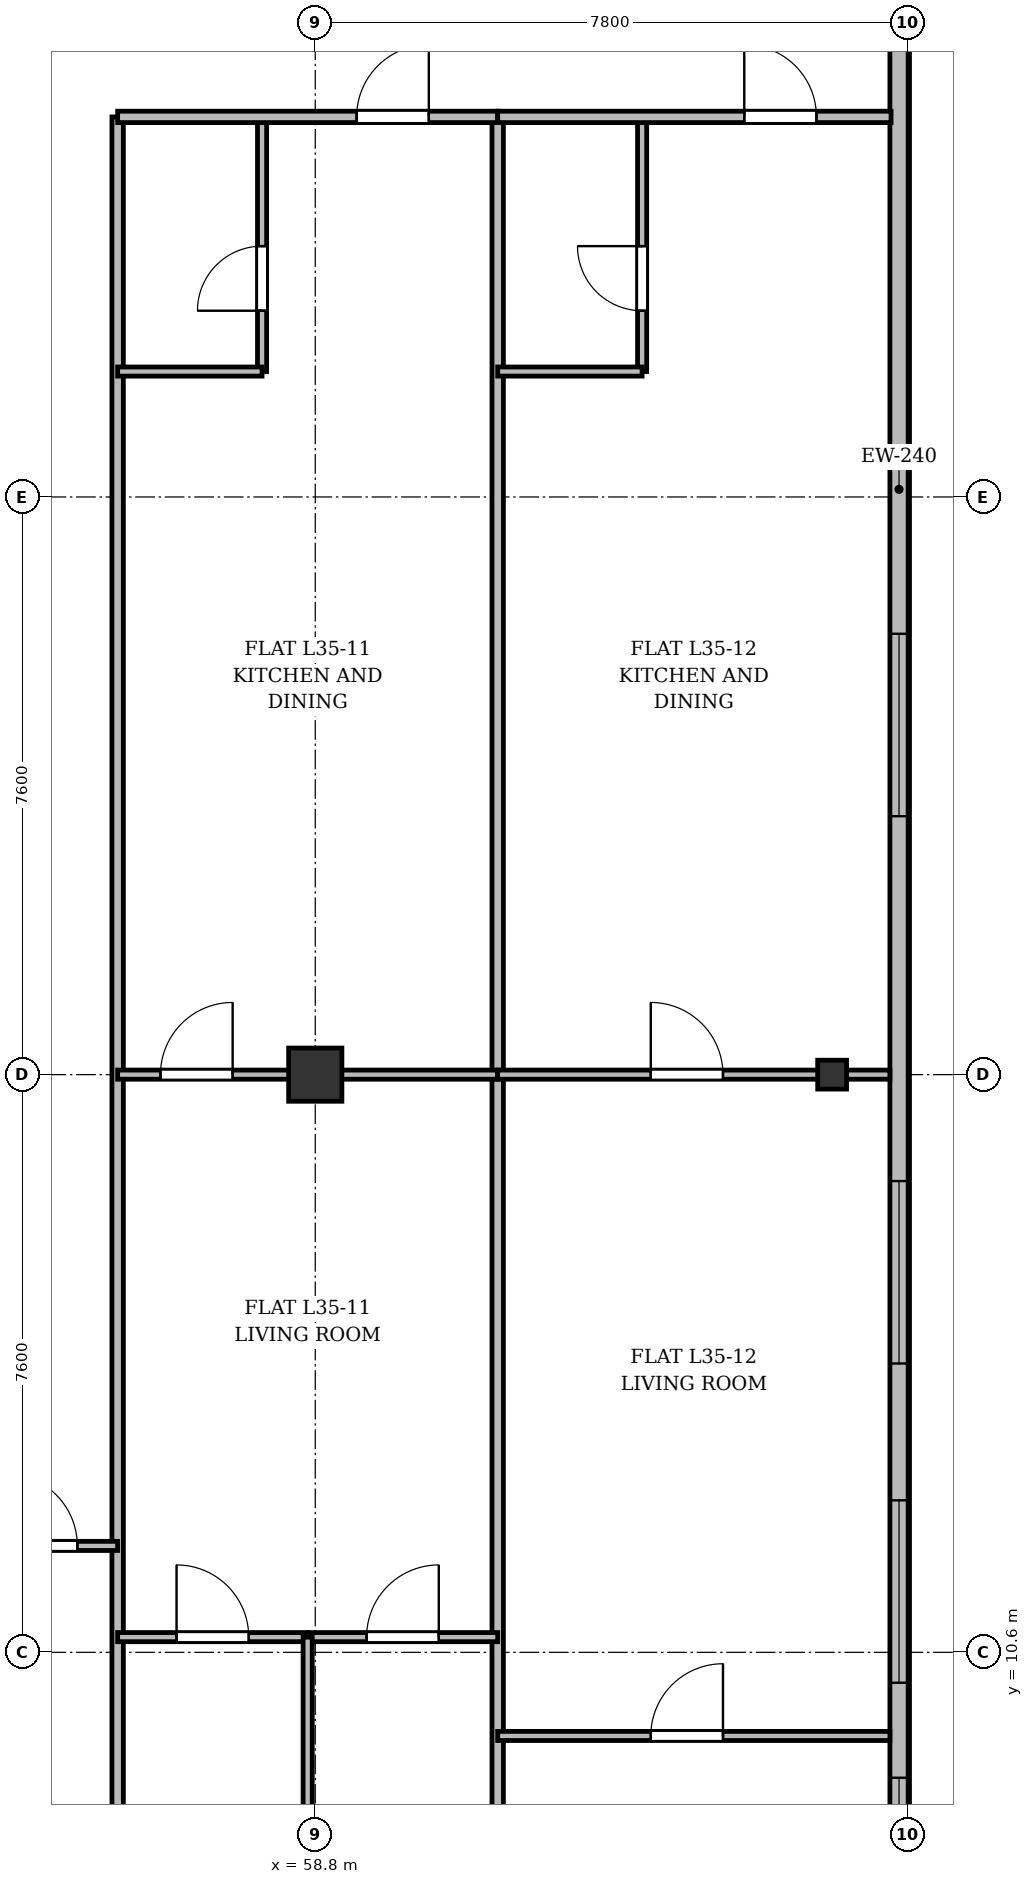
"""IFC4 building model, lengths in metres.
Left out: names, types, materials, properties, quantities, classifications, styles, units other than length and angle.
Written with IfcOpenShell. Run it as: python <this file> out.ifc"""

import sys

from ifc_helpers import new_model, si_unit, direction, frame, frame_2d, origin, origin_2d, place, context, subcontext, project, spatial, rectangle, i_section, extrude, source, transform, mapped, element, fill, save


model = new_model("IFC4")
c1 = context("Model", 3, precision=1e-05, world=origin(), true_north=direction((0.0, 1.0)))
c2 = subcontext(c1, "Body", "Model", "MODEL_VIEW")
j1 = project(units=[si_unit("LENGTHUNIT", "METRE"), si_unit("PLANEANGLEUNIT", "RADIAN")], contexts=[c1])
p1 = place(None, origin())
s1 = spatial("IfcSite", under=j1, at=p1, CompositionType="ELEMENT")
p2 = place(p1, origin())
s2 = spatial("IfcBuilding", under=s1, at=p2, CompositionType="ELEMENT")
p3 = place(p2, frame((0.0, 0.0, 135.7)))
s3 = spatial("IfcBuildingStorey", under=s2, at=p3, CompositionType="ELEMENT", Elevation=135.7)
m1 = source(origin(), c2, "Body", "SweptSolid", [
    extrude(rectangle(XDim=0.7, YDim=0.7, at=origin_2d()), origin(), (0.0, 0.0, 1.0), 3.6),
])
p4 = place(p3, frame((58.8, 18.2, 0.0), z_axis=(0.0, 0.0, 1.0), x_axis=(1.0, 0.0, 0.0)))
e1 = element("IfcColumn", 1, at=p4, inside=s3, PredefinedType="COLUMN", context=c2, shape_type="MappedRepresentation", body=[
    mapped(m1, transform((0.0, 0.0, 0.0), x_axis=(1.0, 0.0, 0.0), y_axis=(0.0, 1.0, 0.0), z_axis=(0.0, 0.0, 1.0), scale=1.0)),
])
m2 = source(origin(), c2, "Body", "SweptSolid", [
    extrude(i_section(OverallWidth=0.38, OverallDepth=0.38, WebThickness=0.02, FlangeThickness=0.03, at=origin_2d()), origin(), (0.0, 0.0, 1.0), 3.6),
])
p5 = place(p3, frame((65.6, 18.2, 0.0), z_axis=(0.0, 0.0, 1.0), x_axis=(1.0, 0.0, 0.0)))
e2 = element("IfcColumn", 2, at=p5, inside=s3, PredefinedType="COLUMN", context=c2, shape_type="MappedRepresentation", body=[
    mapped(m2, transform((0.0, 0.0, 0.0), x_axis=(1.0, 0.0, 0.0), y_axis=(0.0, 1.0, 0.0), z_axis=(0.0, 0.0, 1.0), scale=1.0)),
])
p6 = place(p3, frame((66.48, 45.5, 0.0), z_axis=(0.0, 0.0, 1.0), x_axis=(0.0, -1.0, 0.0)))
e3 = element("IfcWall", 3, at=p6, inside=s3, PredefinedType="SOLIDWALL", context=c2, shape_type="SweptSolid", body=[
    extrude(rectangle(XDim=39.2, YDim=0.24, at=frame_2d((19.6, 0.0))), origin(), (0.0, 0.0, 1.0), 3.35),
])
p7 = place(p6, frame((36.55, 0.0, 0.92)))
e4 = element("IfcOpeningElement", 4, at=p7, cuts=e3, PredefinedType="OPENING", context=c2, shape_type="SweptSolid", body=[
    extrude(rectangle(XDim=1.2, YDim=1.65, at=frame_2d((0.6, 0.825))), frame((0.0, 0.13, 0.0), z_axis=(0.0, -1.0, 0.0), x_axis=(1.0, 0.0, 0.0)), (0.0, 0.0, 1.0), 0.26),
])
p8 = place(p6, frame((32.9, 0.0, 0.92)))
e5 = element("IfcOpeningElement", 5, at=p8, cuts=e3, PredefinedType="OPENING", context=c2, shape_type="SweptSolid", body=[
    extrude(rectangle(XDim=2.4, YDim=2.1, at=frame_2d((1.2, 1.05))), frame((0.0, 0.13, 0.0), z_axis=(0.0, -1.0, 0.0), x_axis=(1.0, 0.0, 0.0)), (0.0, 0.0, 1.0), 0.26),
])
p9 = place(p6, frame((28.7, 0.0, 0.92)))
e6 = element("IfcOpeningElement", 6, at=p9, cuts=e3, PredefinedType="OPENING", context=c2, shape_type="SweptSolid", body=[
    extrude(rectangle(XDim=2.4, YDim=2.1, at=frame_2d((1.2, 1.05))), frame((0.0, 0.13, 0.0), z_axis=(0.0, -1.0, 0.0), x_axis=(1.0, 0.0, 0.0)), (0.0, 0.0, 1.0), 0.26),
])
p10 = place(p6, frame((21.5, 0.0, 0.92)))
e7 = element("IfcOpeningElement", 7, at=p10, cuts=e3, PredefinedType="OPENING", context=c2, shape_type="SweptSolid", body=[
    extrude(rectangle(XDim=2.4, YDim=2.1, at=frame_2d((1.2, 1.05))), frame((0.0, 0.13, 0.0), z_axis=(0.0, -1.0, 0.0), x_axis=(1.0, 0.0, 0.0)), (0.0, 0.0, 1.0), 0.26),
])
p11 = place(p6, frame((7.5, 0.0, 0.92)))
e8 = element("IfcOpeningElement", 8, at=p11, cuts=e3, PredefinedType="OPENING", context=c2, shape_type="SweptSolid", body=[
    extrude(rectangle(XDim=2.4, YDim=2.1, at=frame_2d((1.2, 1.05))), frame((0.0, 0.13, 0.0), z_axis=(0.0, -1.0, 0.0), x_axis=(1.0, 0.0, 0.0)), (0.0, 0.0, 1.0), 0.26),
])
p12 = place(p6, frame((4.5, 0.0, 0.92)))
e9 = element("IfcOpeningElement", 9, at=p12, cuts=e3, PredefinedType="OPENING", context=c2, shape_type="SweptSolid", body=[
    extrude(rectangle(XDim=1.2, YDim=1.65, at=frame_2d((0.6, 0.825))), frame((0.0, 0.13, 0.0), z_axis=(0.0, -1.0, 0.0), x_axis=(1.0, 0.0, 0.0)), (0.0, 0.0, 1.0), 0.26),
])
p13 = place(p6, frame((1.15, 0.0, 0.92)))
e10 = element("IfcOpeningElement", 10, at=p13, cuts=e3, PredefinedType="OPENING", context=c2, shape_type="SweptSolid", body=[
    extrude(rectangle(XDim=1.2, YDim=1.65, at=frame_2d((0.6, 0.825))), frame((0.0, 0.13, 0.0), z_axis=(0.0, -1.0, 0.0), x_axis=(1.0, 0.0, 0.0)), (0.0, 0.0, 1.0), 0.26),
])
for number, where, z_axis, x_axis in (
    (11, (61.2, 3.525, 0.0), (0.0, 0.0, 1.0), (0.0, 1.0, 0.0)),
    (12, (56.2, 3.525, 0.0), (0.0, 0.0, 1.0), (0.0, 1.0, 0.0)),
):
    element("IfcWall", number, at=place(p3, frame(where, z_axis=z_axis, x_axis=x_axis)), inside=s3, PredefinedType="PARTITIONING", context=c2, shape_type="SweptSolid", body=[
        extrude(rectangle(XDim=27.275, YDim=0.15, at=frame_2d((13.638, 0.0))), origin(), (0.0, 0.0, 1.0), 2.75),
    ])
p14 = place(p3, frame((54.2, 12.0, 0.0), z_axis=(0.0, 0.0, 1.0), x_axis=(1.0, 0.0, 0.0)))
e13 = element("IfcWall", 13, at=p14, inside=s3, PredefinedType="PARTITIONING", context=c2, shape_type="SweptSolid", body=[
    extrude(rectangle(XDim=2.0, YDim=0.12, at=frame_2d((1.0, 0.0))), origin(), (0.0, 0.0, 1.0), 3.35),
])
p15 = place(p14, frame((0.52, 0.0, 0.0)))
e14 = element("IfcOpeningElement", 14, at=p15, cuts=e13, PredefinedType="OPENING", context=c2, shape_type="SweptSolid", body=[
    extrude(rectangle(XDim=0.95, YDim=2.15, at=frame_2d((0.475, 1.075))), frame((0.0, 0.07, 0.0), z_axis=(0.0, -1.0, 0.0), x_axis=(1.0, 0.0, 0.0)), (0.0, 0.0, 1.0), 0.14),
])
p16 = place(p3, frame((56.2, 18.2, 0.0), z_axis=(0.0, 0.0, 1.0), x_axis=(1.0, 0.0, 0.0)))
e15 = element("IfcWall", 15, at=p16, inside=s3, PredefinedType="PARTITIONING", context=c2, shape_type="SweptSolid", body=[
    extrude(rectangle(XDim=5.0, YDim=0.12, at=frame_2d((2.5, 0.0))), origin(), (0.0, 0.0, 1.0), 2.75),
])
p17 = place(p16, frame((0.563, 0.0, 0.0)))
e16 = element("IfcOpeningElement", 16, at=p17, cuts=e15, PredefinedType="OPENING", context=c2, shape_type="SweptSolid", body=[
    extrude(rectangle(XDim=0.95, YDim=2.15, at=frame_2d((0.475, 1.075))), frame((0.0, 0.07, 0.0), z_axis=(0.0, -1.0, 0.0), x_axis=(1.0, 0.0, 0.0)), (0.0, 0.0, 1.0), 0.14),
])
p18 = place(p3, frame((58.1, 27.45, 0.0), z_axis=(0.0, 0.0, 1.0), x_axis=(0.0, 1.0, 0.0)))
e17 = element("IfcWall", 17, at=p18, inside=s3, PredefinedType="PARTITIONING", context=c2, shape_type="SweptSolid", body=[
    extrude(rectangle(XDim=3.35, YDim=0.12, at=frame_2d((1.675, 0.0))), origin(), (0.0, 0.0, 1.0), 3.35),
])
p19 = place(p18, frame((0.8, 0.0, 0.0)))
e18 = element("IfcOpeningElement", 18, at=p19, cuts=e17, PredefinedType="OPENING", context=c2, shape_type="SweptSolid", body=[
    extrude(rectangle(XDim=0.85, YDim=2.1, at=frame_2d((0.425, 1.05))), frame((0.0, 0.07, 0.0), z_axis=(0.0, -1.0, 0.0), x_axis=(1.0, 0.0, 0.0)), (0.0, 0.0, 1.0), 0.14),
])
p20 = place(p3, frame((56.2, 27.45, 0.0), z_axis=(0.0, 0.0, 1.0), x_axis=(1.0, 0.0, 0.0)))
e19 = element("IfcWall", 19, at=p20, inside=s3, PredefinedType="PARTITIONING", context=c2, shape_type="SweptSolid", body=[
    extrude(rectangle(XDim=1.9, YDim=0.12, at=frame_2d((0.95, 0.0))), origin(), (0.0, 0.0, 1.0), 3.35),
])
p21 = place(p3, frame((56.2, 30.8, 0.0), z_axis=(0.0, 0.0, 1.0), x_axis=(1.0, 0.0, 0.0)))
e20 = element("IfcWall", 20, at=p21, inside=s3, PredefinedType="PARTITIONING", context=c2, shape_type="SweptSolid", body=[
    extrude(rectangle(XDim=5.0, YDim=0.15, at=frame_2d((2.5, 0.0))), origin(), (0.0, 0.0, 1.0), 2.85),
])
p22 = place(p21, frame((3.144, 0.0, 0.0)))
e21 = element("IfcOpeningElement", 21, at=p22, cuts=e20, PredefinedType="OPENING", context=c2, shape_type="SweptSolid", body=[
    extrude(rectangle(XDim=0.95, YDim=2.15, at=frame_2d((0.475, 1.075))), frame((0.0, 0.085, 0.0), z_axis=(0.0, -1.0, 0.0), x_axis=(1.0, 0.0, 0.0)), (0.0, 0.0, 1.0), 0.17),
])
p23 = place(p3, frame((56.2, 10.8, 0.0), z_axis=(0.0, 0.0, 1.0), x_axis=(1.0, 0.0, 0.0)))
e22 = element("IfcWall", 22, at=p23, inside=s3, PredefinedType="PARTITIONING", context=c2, shape_type="SweptSolid", body=[
    extrude(rectangle(XDim=2.5, YDim=0.12, at=frame_2d((1.25, 0.0))), origin(), (0.0, 0.0, 1.0), 3.0),
])
p24 = place(p23, frame((0.775, 0.0, 0.0)))
e23 = element("IfcOpeningElement", 23, at=p24, cuts=e22, PredefinedType="OPENING", context=c2, shape_type="SweptSolid", body=[
    extrude(rectangle(XDim=0.95, YDim=2.15, at=frame_2d((0.475, 1.075))), frame((0.0, 0.07, 0.0), z_axis=(0.0, -1.0, 0.0), x_axis=(1.0, 0.0, 0.0)), (0.0, 0.0, 1.0), 0.14),
])
p25 = place(p3, frame((58.7, 10.8, 0.0), z_axis=(0.0, 0.0, 1.0), x_axis=(1.0, 0.0, 0.0)))
e24 = element("IfcWall", 24, at=p25, inside=s3, PredefinedType="PARTITIONING", context=c2, shape_type="SweptSolid", body=[
    extrude(rectangle(XDim=2.5, YDim=0.12, at=frame_2d((1.25, 0.0))), origin(), (0.0, 0.0, 1.0), 2.85),
])
p26 = place(p25, frame((0.775, 0.0, 0.0)))
e25 = element("IfcOpeningElement", 25, at=p26, cuts=e24, PredefinedType="OPENING", context=c2, shape_type="SweptSolid", body=[
    extrude(rectangle(XDim=0.95, YDim=2.15, at=frame_2d((0.475, 1.075))), frame((0.0, 0.07, 0.0), z_axis=(0.0, -1.0, 0.0), x_axis=(1.0, 0.0, 0.0)), (0.0, 0.0, 1.0), 0.14),
])
p27 = place(p3, frame((58.7, 3.525, 0.0), z_axis=(0.0, 0.0, 1.0), x_axis=(0.0, 1.0, 0.0)))
e26 = element("IfcWall", 26, at=p27, inside=s3, PredefinedType="PARTITIONING", context=c2, shape_type="SweptSolid", body=[
    extrude(rectangle(XDim=7.275, YDim=0.12, at=frame_2d((3.638, 0.0))), origin(), (0.0, 0.0, 1.0), 2.75),
])
p28 = place(p3, frame((61.2, 18.2, 0.0), z_axis=(0.0, 0.0, 1.0), x_axis=(1.0, 0.0, 0.0)))
e27 = element("IfcWall", 27, at=p28, inside=s3, PredefinedType="PARTITIONING", context=c2, shape_type="SweptSolid", body=[
    extrude(rectangle(XDim=5.16, YDim=0.12, at=frame_2d((2.58, 0.0))), origin(), (0.0, 0.0, 1.0), 2.75),
])
p29 = place(p28, frame((2.014, 0.0, 0.0)))
e28 = element("IfcOpeningElement", 28, at=p29, cuts=e27, PredefinedType="OPENING", context=c2, shape_type="SweptSolid", body=[
    extrude(rectangle(XDim=0.95, YDim=2.15, at=frame_2d((0.475, 1.075))), frame((0.0, 0.07, 0.0), z_axis=(0.0, -1.0, 0.0), x_axis=(1.0, 0.0, 0.0)), (0.0, 0.0, 1.0), 0.14),
])
p30 = place(p3, frame((63.1, 27.45, 0.0), z_axis=(0.0, 0.0, 1.0), x_axis=(0.0, 1.0, 0.0)))
e29 = element("IfcWall", 29, at=p30, inside=s3, PredefinedType="PARTITIONING", context=c2, shape_type="SweptSolid", body=[
    extrude(rectangle(XDim=3.35, YDim=0.12, at=frame_2d((1.675, 0.0))), origin(), (0.0, 0.0, 1.0), 3.35),
])
p31 = place(p30, frame((0.8, 0.0, 0.0)))
e30 = element("IfcOpeningElement", 30, at=p31, cuts=e29, PredefinedType="OPENING", context=c2, shape_type="SweptSolid", body=[
    extrude(rectangle(XDim=0.85, YDim=2.1, at=frame_2d((0.425, 1.05))), frame((0.0, 0.07, 0.0), z_axis=(0.0, -1.0, 0.0), x_axis=(1.0, 0.0, 0.0)), (0.0, 0.0, 1.0), 0.14),
])
p32 = place(p3, frame((61.2, 27.45, 0.0), z_axis=(0.0, 0.0, 1.0), x_axis=(1.0, 0.0, 0.0)))
e31 = element("IfcWall", 31, at=p32, inside=s3, PredefinedType="PARTITIONING", context=c2, shape_type="SweptSolid", body=[
    extrude(rectangle(XDim=1.9, YDim=0.12, at=frame_2d((0.95, 0.0))), origin(), (0.0, 0.0, 1.0), 3.35),
])
p33 = place(p3, frame((61.2, 30.8, 0.0), z_axis=(0.0, 0.0, 1.0), x_axis=(1.0, 0.0, 0.0)))
e32 = element("IfcWall", 32, at=p33, inside=s3, PredefinedType="PARTITIONING", context=c2, shape_type="SweptSolid", body=[
    extrude(rectangle(XDim=5.175, YDim=0.15, at=frame_2d((2.587, 0.0))), origin(), (0.0, 0.0, 1.0), 2.85),
])
p34 = place(p33, frame((3.244, 0.0, 0.0)))
e33 = element("IfcOpeningElement", 33, at=p34, cuts=e32, PredefinedType="OPENING", context=c2, shape_type="SweptSolid", body=[
    extrude(rectangle(XDim=0.95, YDim=2.15, at=frame_2d((0.475, 1.075))), frame((0.0, 0.085, 0.0), z_axis=(0.0, -1.0, 0.0), x_axis=(1.0, 0.0, 0.0)), (0.0, 0.0, 1.0), 0.17),
])
p35 = place(p3, frame((61.2, 9.5, 0.0), z_axis=(0.0, 0.0, 1.0), x_axis=(1.0, 0.0, 0.0)))
e34 = element("IfcWall", 34, at=p35, inside=s3, PredefinedType="PARTITIONING", context=c2, shape_type="SweptSolid", body=[
    extrude(rectangle(XDim=5.16, YDim=0.12, at=frame_2d((2.58, 0.0))), origin(), (0.0, 0.0, 1.0), 2.85),
])
p36 = place(p35, frame((2.014, 0.0, 0.0)))
e35 = element("IfcOpeningElement", 35, at=p36, cuts=e34, PredefinedType="OPENING", context=c2, shape_type="SweptSolid", body=[
    extrude(rectangle(XDim=0.95, YDim=2.15, at=frame_2d((0.475, 1.075))), frame((0.0, 0.07, 0.0), z_axis=(0.0, -1.0, 0.0), x_axis=(1.0, 0.0, 0.0)), (0.0, 0.0, 1.0), 0.14),
])
m3 = source(origin(), c2, "Body", "SweptSolid", [
    extrude(rectangle(XDim=1.2, YDim=1.65, at=frame_2d((0.6, 0.825))), frame((0.0, 0.03, 0.0), z_axis=(0.0, -1.0, 0.0), x_axis=(1.0, 0.0, 0.0)), (0.0, 0.0, 1.0), 0.06),
])
p37 = place(p7, origin())
e36 = element("IfcWindow", 36, at=p37, inside=s3, PartitioningType="SINGLE_PANEL", PredefinedType="WINDOW", context=c2, shape_type="MappedRepresentation", body=[
    mapped(m3, transform((0.0, 0.0, 0.0), x_axis=(1.0, 0.0, 0.0), y_axis=(0.0, 1.0, 0.0), z_axis=(0.0, 0.0, 1.0), scale=1.0)),
])
fill(e4, e36)
m4 = source(origin(), c2, "Body", "SweptSolid", [
    extrude(rectangle(XDim=2.4, YDim=2.1, at=frame_2d((1.2, 1.05))), frame((0.0, 0.03, 0.0), z_axis=(0.0, -1.0, 0.0), x_axis=(1.0, 0.0, 0.0)), (0.0, 0.0, 1.0), 0.06),
])
p38 = place(p8, origin())
e37 = element("IfcWindow", 37, at=p38, inside=s3, PartitioningType="SINGLE_PANEL", PredefinedType="WINDOW", context=c2, shape_type="MappedRepresentation", body=[
    mapped(m4, transform((0.0, 0.0, 0.0), x_axis=(1.0, 0.0, 0.0), y_axis=(0.0, 1.0, 0.0), z_axis=(0.0, 0.0, 1.0), scale=1.0)),
])
fill(e5, e37)
p39 = place(p9, origin())
e38 = element("IfcWindow", 38, at=p39, inside=s3, PartitioningType="SINGLE_PANEL", PredefinedType="WINDOW", context=c2, shape_type="MappedRepresentation", body=[
    mapped(m4, transform((0.0, 0.0, 0.0), x_axis=(1.0, 0.0, 0.0), y_axis=(0.0, 1.0, 0.0), z_axis=(0.0, 0.0, 1.0), scale=1.0)),
])
fill(e6, e38)
p40 = place(p10, origin())
e39 = element("IfcWindow", 39, at=p40, inside=s3, PartitioningType="SINGLE_PANEL", PredefinedType="WINDOW", context=c2, shape_type="MappedRepresentation", body=[
    mapped(m4, transform((0.0, 0.0, 0.0), x_axis=(1.0, 0.0, 0.0), y_axis=(0.0, 1.0, 0.0), z_axis=(0.0, 0.0, 1.0), scale=1.0)),
])
fill(e7, e39)
m5 = source(origin(), c2, "Body", "SweptSolid", [
    extrude(rectangle(XDim=0.95, YDim=2.15, at=frame_2d((0.475, 1.075))), frame((0.0, 0.025, 0.0), z_axis=(0.0, -1.0, 0.0), x_axis=(1.0, 0.0, 0.0)), (0.0, 0.0, 1.0), 0.05),
])
p41 = place(p15, origin())
e40 = element("IfcDoor", 40, at=p41, inside=s3, OperationType="SINGLE_SWING_LEFT", PredefinedType="DOOR", context=c2, shape_type="MappedRepresentation", body=[
    mapped(m5, transform((0.0, 0.0, 0.0), x_axis=(1.0, 0.0, 0.0), y_axis=(0.0, 1.0, 0.0), z_axis=(0.0, 0.0, 1.0), scale=1.0)),
])
fill(e14, e40)
p42 = place(p17, origin())
e41 = element("IfcDoor", 41, at=p42, inside=s3, OperationType="SINGLE_SWING_RIGHT", PredefinedType="DOOR", context=c2, shape_type="MappedRepresentation", body=[
    mapped(m5, transform((0.0, 0.0, 0.0), x_axis=(1.0, 0.0, 0.0), y_axis=(0.0, 1.0, 0.0), z_axis=(0.0, 0.0, 1.0), scale=1.0)),
])
fill(e16, e41)
m6 = source(origin(), c2, "Body", "SweptSolid", [
    extrude(rectangle(XDim=0.85, YDim=2.1, at=frame_2d((0.425, 1.05))), frame((0.0, 0.025, 0.0), z_axis=(0.0, -1.0, 0.0), x_axis=(1.0, 0.0, 0.0)), (0.0, 0.0, 1.0), 0.05),
])
p43 = place(p19, origin())
e42 = element("IfcDoor", 42, at=p43, inside=s3, OperationType="SINGLE_SWING_LEFT", PredefinedType="DOOR", context=c2, shape_type="MappedRepresentation", body=[
    mapped(m6, transform((0.0, 0.0, 0.0), x_axis=(1.0, 0.0, 0.0), y_axis=(0.0, 1.0, 0.0), z_axis=(0.0, 0.0, 1.0), scale=1.0)),
])
fill(e18, e42)
p44 = place(p22, origin())
e43 = element("IfcDoor", 43, at=p44, inside=s3, OperationType="SINGLE_SWING_RIGHT", PredefinedType="DOOR", context=c2, shape_type="MappedRepresentation", body=[
    mapped(m5, transform((0.0, 0.0, 0.0), x_axis=(1.0, 0.0, 0.0), y_axis=(0.0, 1.0, 0.0), z_axis=(0.0, 0.0, 1.0), scale=1.0)),
])
fill(e21, e43)
p45 = place(p24, origin())
e44 = element("IfcDoor", 44, at=p45, inside=s3, OperationType="SINGLE_SWING_LEFT", PredefinedType="DOOR", context=c2, shape_type="MappedRepresentation", body=[
    mapped(m5, transform((0.0, 0.0, 0.0), x_axis=(1.0, 0.0, 0.0), y_axis=(0.0, 1.0, 0.0), z_axis=(0.0, 0.0, 1.0), scale=1.0)),
])
fill(e23, e44)
p46 = place(p26, origin())
e45 = element("IfcDoor", 45, at=p46, inside=s3, OperationType="SINGLE_SWING_RIGHT", PredefinedType="DOOR", context=c2, shape_type="MappedRepresentation", body=[
    mapped(m5, transform((0.0, 0.0, 0.0), x_axis=(1.0, 0.0, 0.0), y_axis=(0.0, 1.0, 0.0), z_axis=(0.0, 0.0, 1.0), scale=1.0)),
])
fill(e25, e45)
p47 = place(p29, origin())
e46 = element("IfcDoor", 46, at=p47, inside=s3, OperationType="SINGLE_SWING_LEFT", PredefinedType="DOOR", context=c2, shape_type="MappedRepresentation", body=[
    mapped(m5, transform((0.0, 0.0, 0.0), x_axis=(1.0, 0.0, 0.0), y_axis=(0.0, 1.0, 0.0), z_axis=(0.0, 0.0, 1.0), scale=1.0)),
])
fill(e28, e46)
p48 = place(p31, origin())
e47 = element("IfcDoor", 47, at=p48, inside=s3, OperationType="SINGLE_SWING_RIGHT", PredefinedType="DOOR", context=c2, shape_type="MappedRepresentation", body=[
    mapped(m6, transform((0.0, 0.0, 0.0), x_axis=(1.0, 0.0, 0.0), y_axis=(0.0, 1.0, 0.0), z_axis=(0.0, 0.0, 1.0), scale=1.0)),
])
fill(e30, e47)
p49 = place(p34, origin())
e48 = element("IfcDoor", 48, at=p49, inside=s3, OperationType="SINGLE_SWING_LEFT", PredefinedType="DOOR", context=c2, shape_type="MappedRepresentation", body=[
    mapped(m5, transform((0.0, 0.0, 0.0), x_axis=(1.0, 0.0, 0.0), y_axis=(0.0, 1.0, 0.0), z_axis=(0.0, 0.0, 1.0), scale=1.0)),
])
fill(e33, e48)
p50 = place(p36, origin())
e49 = element("IfcDoor", 49, at=p50, inside=s3, OperationType="SINGLE_SWING_RIGHT", PredefinedType="DOOR", context=c2, shape_type="MappedRepresentation", body=[
    mapped(m5, transform((0.0, 0.0, 0.0), x_axis=(1.0, 0.0, 0.0), y_axis=(0.0, 1.0, 0.0), z_axis=(0.0, 0.0, 1.0), scale=1.0)),
])
fill(e35, e49)
save(model, sys.argv[1])
